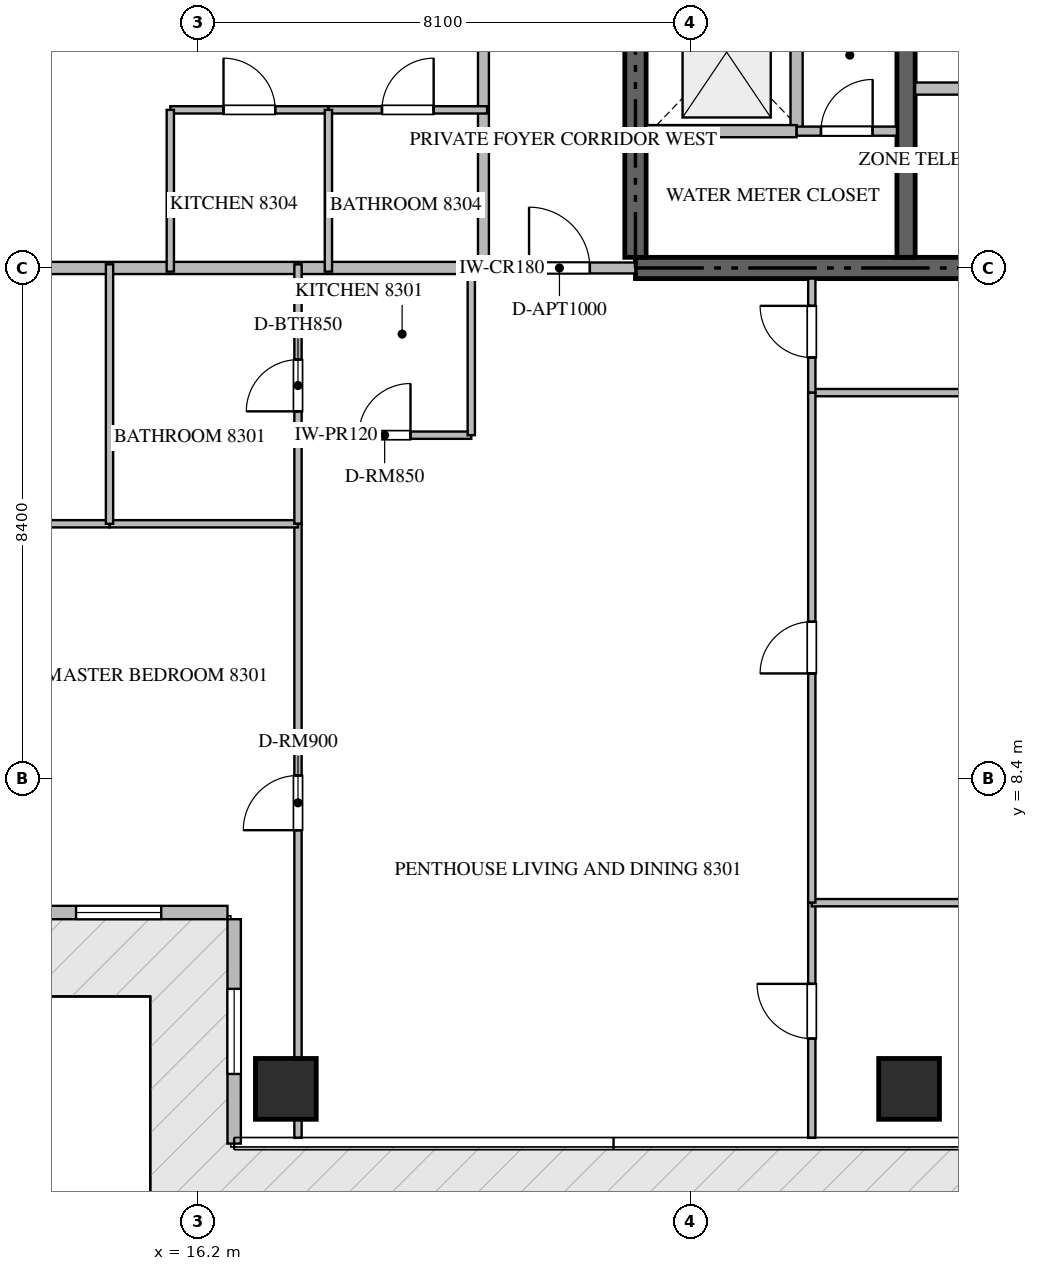
"""IFC4 building model, lengths in metres.
Left out: names, types, materials, properties, quantities, classifications, styles, units other than length and angle.
Written with IfcOpenShell. Run it as: python <this file> out.ifc"""

import sys

from ifc_helpers import new_model, si_unit, direction, frame, frame_2d, origin, origin_2d, place, context, subcontext, project, spatial, rectangle, extrude, source, transform, mapped, element, fill, save


model = new_model("IFC4")
c1 = context("Model", 3, precision=1e-05, world=origin(), true_north=direction((0.0, 1.0)))
c2 = subcontext(c1, "Body", "Model", "MODEL_VIEW")
j1 = project(units=[si_unit("LENGTHUNIT", "METRE"), si_unit("PLANEANGLEUNIT", "RADIAN")], contexts=[c1])
p1 = place(None, origin())
s1 = spatial("IfcSite", under=j1, at=p1, CompositionType="ELEMENT")
p2 = place(p1, origin())
s2 = spatial("IfcBuilding", under=s1, at=p2, CompositionType="ELEMENT")
p3 = place(p2, frame((0.0, 0.0, 333.95)))
s3 = spatial("IfcBuildingStorey", under=s2, at=p3, CompositionType="ELEMENT", Elevation=333.95)
p4 = place(p3, frame((23.4, 16.8, -0.26), z_axis=(0.0, 0.0, 1.0), x_axis=(1.0, 0.0, 0.0)))
e1 = element("IfcWall", 1, at=p4, inside=s3, PredefinedType="SHEAR", context=c2, shape_type="SweptSolid", body=[
    extrude(rectangle(XDim=18.0, YDim=0.35, at=frame_2d((9.0, 0.0))), origin(), (0.0, 0.0, 1.0), 3.868),
])
p5 = place(p3, frame((23.4, 16.975, -0.26), z_axis=(0.0, 0.0, 1.0), x_axis=(0.0, 1.0, 0.0)))
e2 = element("IfcWall", 2, at=p5, inside=s3, PredefinedType="SHEAR", context=c2, shape_type="SweptSolid", body=[
    extrude(rectangle(XDim=4.875, YDim=0.35, at=frame_2d((2.438, 0.0))), origin(), (0.0, 0.0, 1.0), 3.868),
])
p6 = place(p3, frame((27.85, 16.975, -0.26), z_axis=(0.0, 0.0, 1.0), x_axis=(0.0, 1.0, 0.0)))
e3 = element("IfcWall", 3, at=p6, inside=s3, PredefinedType="SHEAR", context=c2, shape_type="SweptSolid", body=[
    extrude(rectangle(XDim=4.875, YDim=0.3, at=frame_2d((2.438, 0.0))), origin(), (0.0, 0.0, 1.0), 3.868),
])
m1 = source(origin(), c2, "Body", "SweptSolid", [
    extrude(rectangle(XDim=1.0, YDim=1.0, at=origin_2d()), origin(), (0.0, 0.0, 1.0), 3.87),
])
for number, where, z_axis, x_axis in (
    (4, (17.65, 3.3, -0.26), (0.0, 0.0, 1.0), (1.0, 0.0, 0.0)),
    (5, (27.9, 3.3, -0.26), (0.0, 0.0, 1.0), (1.0, 0.0, 0.0)),
):
    element("IfcColumn", number, at=place(p3, frame(where, z_axis=z_axis, x_axis=x_axis)), inside=s3, PredefinedType="COLUMN", context=c2, shape_type="MappedRepresentation", body=[
        mapped(m1, transform((0.0, 0.0, 0.0), scale=1.0)),
    ])
p7 = place(p3, frame((13.11, 6.2, 0.0), z_axis=(0.0, 0.0, 1.0), x_axis=(1.0, 0.0, 0.0)))
e6 = element("IfcWall", 6, at=p7, inside=s3, PredefinedType="ELEMENTEDWALL", context=c2, shape_type="SweptSolid", body=[
    extrude(rectangle(XDim=3.58, YDim=0.22, at=frame_2d((1.79, 0.0))), origin(), (0.0, 0.0, 1.0), 3.595),
])
p8 = place(p7, frame((1.09, 0.0, 0.65)))
e7 = element("IfcOpeningElement", 7, at=p8, cuts=e6, PredefinedType="OPENING", context=c2, shape_type="SweptSolid", body=[
    extrude(rectangle(XDim=1.4, YDim=1.35, at=frame_2d((0.7, 0.675))), frame((0.0, 0.12, 0.0), z_axis=(0.0, -1.0, 0.0), x_axis=(1.0, 0.0, 0.0)), (0.0, 0.0, 1.0), 0.24),
])
p9 = place(p3, frame((16.8, 6.09, 0.0), z_axis=(0.0, 0.0, 1.0), x_axis=(0.0, -1.0, 0.0)))
e8 = element("IfcWall", 8, at=p9, inside=s3, PredefinedType="ELEMENTEDWALL", context=c2, shape_type="SweptSolid", body=[
    extrude(rectangle(XDim=3.69, YDim=0.22, at=frame_2d((1.845, 0.0))), origin(), (0.0, 0.0, 1.0), 3.595),
])
p10 = place(p9, frame((1.145, 0.0, 0.65)))
e9 = element("IfcOpeningElement", 9, at=p10, cuts=e8, PredefinedType="OPENING", context=c2, shape_type="SweptSolid", body=[
    extrude(rectangle(XDim=1.4, YDim=1.35, at=frame_2d((0.7, 0.675))), frame((0.0, 0.12, 0.0), z_axis=(0.0, -1.0, 0.0), x_axis=(1.0, 0.0, 0.0)), (0.0, 0.0, 1.0), 0.24),
])
p11 = place(p3, frame((26.05, 19.05, 0.0), z_axis=(0.0, 0.0, 1.0), x_axis=(0.0, 1.0, 0.0)))
e10 = element("IfcWall", 10, at=p11, inside=s3, PredefinedType="STANDARD", context=c2, shape_type="SweptSolid", body=[
    extrude(rectangle(XDim=2.5, YDim=0.2, at=frame_2d((1.25, 0.0))), origin(), (0.0, 0.0, 1.0), 3.61),
])
p12 = place(p3, frame((23.575, 19.05, 0.0), z_axis=(0.0, 0.0, 1.0), x_axis=(1.0, 0.0, 0.0)))
e11 = element("IfcWall", 11, at=p12, inside=s3, PredefinedType="STANDARD", context=c2, shape_type="SweptSolid", body=[
    extrude(rectangle(XDim=2.475, YDim=0.2, at=frame_2d((1.238, 0.0))), origin(), (0.0, 0.0, 1.0), 3.61),
])
p13 = place(p3, frame((26.052, 19.05, 0.0), z_axis=(0.0, 0.0, 1.0), x_axis=(1.0, 0.0, 0.0)))
e12 = element("IfcWall", 12, at=p13, inside=s3, PredefinedType="PARTITIONING", context=c2, shape_type="SweptSolid", body=[
    extrude(rectangle(XDim=1.648, YDim=0.15, at=frame_2d((0.824, 0.0))), origin(), (0.0, 0.0, 1.0), 3.61),
])
p14 = place(p13, frame((0.399, 0.0, 0.0)))
e13 = element("IfcOpeningElement", 13, at=p14, cuts=e12, PredefinedType="OPENING", context=c2, shape_type="SweptSolid", body=[
    extrude(rectangle(XDim=0.85, YDim=2.1, at=frame_2d((0.425, 1.05))), frame((0.0, 0.085, 0.0), z_axis=(0.0, -1.0, 0.0), x_axis=(1.0, 0.0, 0.0)), (0.0, 0.0, 1.0), 0.17),
])
p15 = place(p3, frame((28.0, 19.75, 0.0), z_axis=(0.0, 0.0, 1.0), x_axis=(1.0, 0.0, 0.0)))
e14 = element("IfcWall", 14, at=p15, inside=s3, PredefinedType="STANDARD", context=c2, shape_type="SweptSolid", body=[
    extrude(rectangle(XDim=6.0, YDim=0.2, at=frame_2d((3.0, 0.0))), origin(), (0.0, 0.0, 1.0), 3.61),
])
p16 = place(p15, frame((2.55, 0.0, 0.0)))
e15 = element("IfcOpeningElement", 15, at=p16, cuts=e14, PredefinedType="OPENING", context=c2, shape_type="SweptSolid", body=[
    extrude(rectangle(XDim=0.9, YDim=2.1, at=frame_2d((0.45, 1.05))), frame((0.0, 0.11, 0.0), z_axis=(0.0, -1.0, 0.0), x_axis=(1.0, 0.0, 0.0)), (0.0, 0.0, 1.0), 0.22),
])
p17 = place(p3, frame((9.282, 16.8, 0.0), z_axis=(0.0, 0.0, 1.0), x_axis=(1.0, 0.0, 0.0)))
e16 = element("IfcWall", 16, at=p17, inside=s3, PredefinedType="PARTITIONING", context=c2, shape_type="SweptSolid", body=[
    extrude(rectangle(XDim=11.618, YDim=0.2, at=frame_2d((5.809, 0.0))), origin(), (0.0, 0.0, 1.0), 3.61),
])
p18 = place(p3, frame((20.902, 16.8, 0.0), z_axis=(0.0, 0.0, 1.0), x_axis=(1.0, 0.0, 0.0)))
e17 = element("IfcWall", 17, at=p18, inside=s3, PredefinedType="PARTITIONING", context=c2, shape_type="SweptSolid", body=[
    extrude(rectangle(XDim=2.496, YDim=0.18, at=frame_2d((1.248, 0.0))), origin(), (0.0, 0.0, 1.0), 3.61),
])
p19 = place(p18, frame((0.748, 0.0, 0.0)))
e18 = element("IfcOpeningElement", 18, at=p19, cuts=e17, PredefinedType="OPENING", context=c2, shape_type="SweptSolid", body=[
    extrude(rectangle(XDim=1.0, YDim=2.15, at=frame_2d((0.5, 1.075))), frame((0.0, 0.1, 0.0), z_axis=(0.0, -1.0, 0.0), x_axis=(1.0, 0.0, 0.0)), (0.0, 0.0, 1.0), 0.2),
])
p20 = place(p3, frame((20.9, 16.8, 0.0), z_axis=(0.0, 0.0, 1.0), x_axis=(0.0, 1.0, 0.0)))
e19 = element("IfcWall", 19, at=p20, inside=s3, PredefinedType="PARTITIONING", context=c2, shape_type="SweptSolid", body=[
    extrude(rectangle(XDim=16.8, YDim=0.18, at=frame_2d((8.4, 0.0))), origin(), (0.0, 0.0, 1.0), 3.61),
])
p21 = place(p20, frame((4.503, 0.0, 0.0)))
e20 = element("IfcOpeningElement", 20, at=p21, cuts=e19, PredefinedType="OPENING", context=c2, shape_type="SweptSolid", body=[
    extrude(rectangle(XDim=1.0, YDim=2.15, at=frame_2d((0.5, 1.075))), frame((0.0, 0.1, 0.0), z_axis=(0.0, -1.0, 0.0), x_axis=(1.0, 0.0, 0.0)), (0.0, 0.0, 1.0), 0.2),
])
p22 = place(p20, frame((8.706, 0.0, 0.0)))
e21 = element("IfcOpeningElement", 21, at=p22, cuts=e19, PredefinedType="OPENING", context=c2, shape_type="SweptSolid", body=[
    extrude(rectangle(XDim=1.0, YDim=2.15, at=frame_2d((0.5, 1.075))), frame((0.0, 0.1, 0.0), z_axis=(0.0, -1.0, 0.0), x_axis=(1.0, 0.0, 0.0)), (0.0, 0.0, 1.0), 0.2),
])
p23 = place(p3, frame((17.85, 14.05, 0.0), z_axis=(0.0, 0.0, 1.0), x_axis=(1.0, 0.0, 0.0)))
e22 = element("IfcWall", 22, at=p23, inside=s3, PredefinedType="PARTITIONING", context=c2, shape_type="SweptSolid", body=[
    extrude(rectangle(XDim=2.85, YDim=0.12, at=frame_2d((1.425, 0.0))), origin(), (0.0, 0.0, 1.0), 3.61),
])
p24 = place(p23, frame((1.0, 0.0, 0.0)))
e23 = element("IfcOpeningElement", 23, at=p24, cuts=e22, PredefinedType="OPENING", context=c2, shape_type="SweptSolid", body=[
    extrude(rectangle(XDim=0.85, YDim=2.1, at=frame_2d((0.425, 1.05))), frame((0.0, 0.07, 0.0), z_axis=(0.0, -1.0, 0.0), x_axis=(1.0, 0.0, 0.0)), (0.0, 0.0, 1.0), 0.14),
])
p25 = place(p3, frame((20.7, 14.05, 0.0), z_axis=(0.0, 0.0, 1.0), x_axis=(0.0, 1.0, 0.0)))
e24 = element("IfcWall", 24, at=p25, inside=s3, PredefinedType="PARTITIONING", context=c2, shape_type="SweptSolid", body=[
    extrude(rectangle(XDim=2.81, YDim=0.12, at=frame_2d((1.405, 0.0))), origin(), (0.0, 0.0, 1.0), 3.61),
])
p26 = place(p3, frame((17.85, 2.495, 0.0), z_axis=(0.0, 0.0, 1.0), x_axis=(0.0, 1.0, 0.0)))
e25 = element("IfcWall", 25, at=p26, inside=s3, PredefinedType="PARTITIONING", context=c2, shape_type="SweptSolid", body=[
    extrude(rectangle(XDim=10.098, YDim=0.12, at=frame_2d((5.049, 0.0))), origin(), (0.0, 0.0, 1.0), 2.445),
])
p27 = place(p26, frame((5.059, 0.0, 0.0)))
e26 = element("IfcOpeningElement", 26, at=p27, cuts=e25, PredefinedType="OPENING", context=c2, shape_type="SweptSolid", body=[
    extrude(rectangle(XDim=0.9, YDim=2.1, at=frame_2d((0.45, 1.05))), frame((0.0, 0.07, 0.0), z_axis=(0.0, -1.0, 0.0), x_axis=(1.0, 0.0, 0.0)), (0.0, 0.0, 1.0), 0.14),
])
p28 = place(p3, frame((9.295, 12.593, 0.0), z_axis=(0.0, 0.0, 1.0), x_axis=(1.0, 0.0, 0.0)))
e27 = element("IfcWall", 27, at=p28, inside=s3, PredefinedType="PARTITIONING", context=c2, shape_type="SweptSolid", body=[
    extrude(rectangle(XDim=5.455, YDim=0.12, at=frame_2d((2.728, 0.0))), origin(), (0.0, 0.0, 1.0), 3.61),
])
p29 = place(p28, frame((3.224, 0.0, 0.0)))
e28 = element("IfcOpeningElement", 28, at=p29, cuts=e27, PredefinedType="OPENING", context=c2, shape_type="SweptSolid", body=[
    extrude(rectangle(XDim=0.85, YDim=2.1, at=frame_2d((0.425, 1.05))), frame((0.0, 0.07, 0.0), z_axis=(0.0, -1.0, 0.0), x_axis=(1.0, 0.0, 0.0)), (0.0, 0.0, 1.0), 0.14),
])
p30 = place(p3, frame((14.752, 12.593, 0.0), z_axis=(0.0, 0.0, 1.0), x_axis=(1.0, 0.0, 0.0)))
e29 = element("IfcWall", 29, at=p30, inside=s3, PredefinedType="PARTITIONING", context=c2, shape_type="SweptSolid", body=[
    extrude(rectangle(XDim=3.098, YDim=0.12, at=frame_2d((1.549, 0.0))), origin(), (0.0, 0.0, 1.0), 3.61),
])
p31 = place(p3, frame((14.75, 12.593, 0.0), z_axis=(0.0, 0.0, 1.0), x_axis=(0.0, 1.0, 0.0)))
e30 = element("IfcWall", 30, at=p31, inside=s3, PredefinedType="PARTITIONING", context=c2, shape_type="SweptSolid", body=[
    extrude(rectangle(XDim=4.267, YDim=0.12, at=frame_2d((2.134, 0.0))), origin(), (0.0, 0.0, 1.0), 3.61),
])
p32 = place(p3, frame((17.85, 12.595, 0.0), z_axis=(0.0, 0.0, 1.0), x_axis=(0.0, 1.0, 0.0)))
e31 = element("IfcWall", 31, at=p32, inside=s3, PredefinedType="PARTITIONING", context=c2, shape_type="SweptSolid", body=[
    extrude(rectangle(XDim=4.265, YDim=0.12, at=frame_2d((2.133, 0.0))), origin(), (0.0, 0.0, 1.0), 2.445),
])
p33 = place(p32, frame((1.847, 0.0, 0.0)))
e32 = element("IfcOpeningElement", 32, at=p33, cuts=e31, PredefinedType="OPENING", context=c2, shape_type="SweptSolid", body=[
    extrude(rectangle(XDim=0.85, YDim=2.1, at=frame_2d((0.425, 1.05))), frame((0.0, 0.07, 0.0), z_axis=(0.0, -1.0, 0.0), x_axis=(1.0, 0.0, 0.0)), (0.0, 0.0, 1.0), 0.14),
])
p34 = place(p3, frame((26.3, 2.495, 0.0), z_axis=(0.0, 0.0, 1.0), x_axis=(0.0, 1.0, 0.0)))
e33 = element("IfcWall", 33, at=p34, inside=s3, PredefinedType="PARTITIONING", context=c2, shape_type="SweptSolid", body=[
    extrude(rectangle(XDim=3.867, YDim=0.12, at=frame_2d((1.934, 0.0))), origin(), (0.0, 0.0, 1.0), 3.61),
])
p35 = place(p34, frame((1.632, 0.0, 0.0)))
e34 = element("IfcOpeningElement", 34, at=p35, cuts=e33, PredefinedType="OPENING", context=c2, shape_type="SweptSolid", body=[
    extrude(rectangle(XDim=0.9, YDim=2.1, at=frame_2d((0.45, 1.05))), frame((0.0, 0.07, 0.0), z_axis=(0.0, -1.0, 0.0), x_axis=(1.0, 0.0, 0.0)), (0.0, 0.0, 1.0), 0.14),
])
for number, where, z_axis, x_axis in (
    (35, (26.3, 6.362, 0.0), (0.0, 0.0, 1.0), (1.0, 0.0, 0.0)),
    (36, (26.3, 14.75, 0.0), (0.0, 0.0, 1.0), (1.0, 0.0, 0.0)),
):
    element("IfcWall", number, at=place(p3, frame(where, z_axis=z_axis, x_axis=x_axis)), inside=s3, PredefinedType="PARTITIONING", context=c2, shape_type="SweptSolid", body=[
        extrude(rectangle(XDim=9.06, YDim=0.12, at=frame_2d((4.53, 0.0))), origin(), (0.0, 0.0, 1.0), 3.61),
    ])
p36 = place(p3, frame((26.3, 6.364, 0.0), z_axis=(0.0, 0.0, 1.0), x_axis=(0.0, 1.0, 0.0)))
e37 = element("IfcWall", 37, at=p36, inside=s3, PredefinedType="PARTITIONING", context=c2, shape_type="SweptSolid", body=[
    extrude(rectangle(XDim=8.386, YDim=0.12, at=frame_2d((4.193, 0.0))), origin(), (0.0, 0.0, 1.0), 3.61),
])
p37 = place(p36, frame((3.768, 0.0, 0.0)))
e38 = element("IfcOpeningElement", 38, at=p37, cuts=e37, PredefinedType="OPENING", context=c2, shape_type="SweptSolid", body=[
    extrude(rectangle(XDim=0.85, YDim=2.1, at=frame_2d((0.425, 1.05))), frame((0.0, 0.07, 0.0), z_axis=(0.0, -1.0, 0.0), x_axis=(1.0, 0.0, 0.0)), (0.0, 0.0, 1.0), 0.14),
])
p38 = place(p3, frame((26.3, 14.752, 0.0), z_axis=(0.0, 0.0, 1.0), x_axis=(0.0, 1.0, 0.0)))
e39 = element("IfcWall", 39, at=p38, inside=s3, PredefinedType="PARTITIONING", context=c2, shape_type="SweptSolid", body=[
    extrude(rectangle(XDim=1.873, YDim=0.12, at=frame_2d((0.937, 0.0))), origin(), (0.0, 0.0, 1.0), 3.61),
])
p39 = place(p38, frame((0.575, 0.0, 0.0)))
e40 = element("IfcOpeningElement", 40, at=p39, cuts=e39, PredefinedType="OPENING", context=c2, shape_type="SweptSolid", body=[
    extrude(rectangle(XDim=0.85, YDim=2.1, at=frame_2d((0.425, 1.05))), frame((0.0, 0.07, 0.0), z_axis=(0.0, -1.0, 0.0), x_axis=(1.0, 0.0, 0.0)), (0.0, 0.0, 1.0), 0.14),
])
p40 = place(p3, frame((15.75, 19.4, 0.0), z_axis=(0.0, 0.0, 1.0), x_axis=(1.0, 0.0, 0.0)))
e41 = element("IfcWall", 41, at=p40, inside=s3, PredefinedType="PARTITIONING", context=c2, shape_type="SweptSolid", body=[
    extrude(rectangle(XDim=2.6, YDim=0.12, at=frame_2d((1.3, 0.0))), origin(), (0.0, 0.0, 1.0), 3.61),
])
p41 = place(p40, frame((0.875, 0.0, 0.0)))
e42 = element("IfcOpeningElement", 42, at=p41, cuts=e41, PredefinedType="OPENING", context=c2, shape_type="SweptSolid", body=[
    extrude(rectangle(XDim=0.85, YDim=2.1, at=frame_2d((0.425, 1.05))), frame((0.0, 0.07, 0.0), z_axis=(0.0, -1.0, 0.0), x_axis=(1.0, 0.0, 0.0)), (0.0, 0.0, 1.0), 0.14),
])
p42 = place(p3, frame((18.352, 19.4, 0.0), z_axis=(0.0, 0.0, 1.0), x_axis=(1.0, 0.0, 0.0)))
e43 = element("IfcWall", 43, at=p42, inside=s3, PredefinedType="PARTITIONING", context=c2, shape_type="SweptSolid", body=[
    extrude(rectangle(XDim=2.608, YDim=0.12, at=frame_2d((1.304, 0.0))), origin(), (0.0, 0.0, 1.0), 3.61),
])
p43 = place(p42, frame((0.879, 0.0, 0.0)))
e44 = element("IfcOpeningElement", 44, at=p43, cuts=e43, PredefinedType="OPENING", context=c2, shape_type="SweptSolid", body=[
    extrude(rectangle(XDim=0.85, YDim=2.1, at=frame_2d((0.425, 1.05))), frame((0.0, 0.07, 0.0), z_axis=(0.0, -1.0, 0.0), x_axis=(1.0, 0.0, 0.0)), (0.0, 0.0, 1.0), 0.14),
])
for number, where, z_axis, x_axis in (
    (45, (18.35, 16.74, 0.0), (0.0, 0.0, 1.0), (0.0, 1.0, 0.0)),
    (46, (15.75, 16.74, 0.0), (0.0, 0.0, 1.0), (0.0, 1.0, 0.0)),
):
    element("IfcWall", number, at=place(p3, frame(where, z_axis=z_axis, x_axis=x_axis)), inside=s3, PredefinedType="PARTITIONING", context=c2, shape_type="SweptSolid", body=[
        extrude(rectangle(XDim=2.66, YDim=0.12, at=frame_2d((1.33, 0.0))), origin(), (0.0, 0.0, 1.0), 3.61),
    ])
m2 = source(origin(), c2, "Body", "SweptSolid", [
    extrude(rectangle(XDim=1.4, YDim=1.35, at=frame_2d((0.7, 0.675))), frame((0.0, 0.03, 0.0), z_axis=(0.0, -1.0, 0.0), x_axis=(1.0, 0.0, 0.0)), (0.0, 0.0, 1.0), 0.06),
])
p44 = place(p8, origin())
e47 = element("IfcWindow", 47, at=p44, inside=s3, PartitioningType="SINGLE_PANEL", PredefinedType="WINDOW", context=c2, shape_type="MappedRepresentation", body=[
    mapped(m2, transform((0.0, 0.0, 0.0), scale=1.0)),
])
fill(e7, e47)
p45 = place(p10, origin())
e48 = element("IfcWindow", 48, at=p45, inside=s3, PartitioningType="SINGLE_PANEL", PredefinedType="WINDOW", context=c2, shape_type="MappedRepresentation", body=[
    mapped(m2, transform((0.0, 0.0, 0.0), scale=1.0)),
])
fill(e9, e48)
m3 = source(origin(), c2, "Body", "SweptSolid", [
    extrude(rectangle(XDim=0.85, YDim=2.1, at=frame_2d((0.425, 1.05))), frame((0.0, 0.025, 0.0), z_axis=(0.0, -1.0, 0.0), x_axis=(1.0, 0.0, 0.0)), (0.0, 0.0, 1.0), 0.05),
])
p46 = place(p14, origin())
e49 = element("IfcDoor", 49, at=p46, inside=s3, OperationType="SINGLE_SWING_RIGHT", PredefinedType="DOOR", context=c2, shape_type="MappedRepresentation", body=[
    mapped(m3, transform((0.0, 0.0, 0.0), scale=1.0)),
])
fill(e13, e49)
m4 = source(origin(), c2, "Body", "SweptSolid", [
    extrude(rectangle(XDim=1.0, YDim=2.15, at=frame_2d((0.5, 1.075))), frame((0.0, 0.025, 0.0), z_axis=(0.0, -1.0, 0.0), x_axis=(1.0, 0.0, 0.0)), (0.0, 0.0, 1.0), 0.05),
])
p47 = place(p19, origin())
e50 = element("IfcDoor", 50, at=p47, inside=s3, OperationType="SINGLE_SWING_LEFT", PredefinedType="DOOR", context=c2, shape_type="MappedRepresentation", body=[
    mapped(m4, transform((0.0, 0.0, 0.0), scale=1.0)),
])
fill(e18, e50)
p48 = place(p24, origin())
e51 = element("IfcDoor", 51, at=p48, inside=s3, OperationType="SINGLE_SWING_RIGHT", PredefinedType="DOOR", context=c2, shape_type="MappedRepresentation", body=[
    mapped(m3, transform((0.0, 0.0, 0.0), scale=1.0)),
])
fill(e23, e51)
m5 = source(origin(), c2, "Body", "SweptSolid", [
    extrude(rectangle(XDim=0.9, YDim=2.1, at=frame_2d((0.45, 1.05))), frame((0.0, 0.025, 0.0), z_axis=(0.0, -1.0, 0.0), x_axis=(1.0, 0.0, 0.0)), (0.0, 0.0, 1.0), 0.05),
])
p49 = place(p27, origin())
e52 = element("IfcDoor", 52, at=p49, inside=s3, OperationType="SINGLE_SWING_LEFT", PredefinedType="DOOR", context=c2, shape_type="MappedRepresentation", body=[
    mapped(m5, transform((0.0, 0.0, 0.0), scale=1.0)),
])
fill(e26, e52)
p50 = place(p33, origin())
e53 = element("IfcDoor", 53, at=p50, inside=s3, OperationType="SINGLE_SWING_LEFT", PredefinedType="DOOR", context=c2, shape_type="MappedRepresentation", body=[
    mapped(m3, transform((0.0, 0.0, 0.0), scale=1.0)),
])
fill(e32, e53)
p51 = place(p35, origin())
e54 = element("IfcDoor", 54, at=p51, inside=s3, OperationType="SINGLE_SWING_RIGHT", PredefinedType="DOOR", context=c2, shape_type="MappedRepresentation", body=[
    mapped(m5, transform((0.0, 0.0, 0.0), scale=1.0)),
])
fill(e34, e54)
p52 = place(p37, origin())
e55 = element("IfcDoor", 55, at=p52, inside=s3, OperationType="SINGLE_SWING_LEFT", PredefinedType="DOOR", context=c2, shape_type="MappedRepresentation", body=[
    mapped(m3, transform((0.0, 0.0, 0.0), scale=1.0)),
])
fill(e38, e55)
p53 = place(p39, origin())
e56 = element("IfcDoor", 56, at=p53, inside=s3, OperationType="SINGLE_SWING_RIGHT", PredefinedType="DOOR", context=c2, shape_type="MappedRepresentation", body=[
    mapped(m3, transform((0.0, 0.0, 0.0), scale=1.0)),
])
fill(e40, e56)
p54 = place(p41, origin())
e57 = element("IfcDoor", 57, at=p54, inside=s3, OperationType="SINGLE_SWING_LEFT", PredefinedType="DOOR", context=c2, shape_type="MappedRepresentation", body=[
    mapped(m3, transform((0.0, 0.0, 0.0), scale=1.0)),
])
fill(e42, e57)
p55 = place(p43, origin())
e58 = element("IfcDoor", 58, at=p55, inside=s3, OperationType="SINGLE_SWING_RIGHT", PredefinedType="DOOR", context=c2, shape_type="MappedRepresentation", body=[
    mapped(m3, transform((0.0, 0.0, 0.0), scale=1.0)),
])
fill(e44, e58)
save(model, sys.argv[1])
